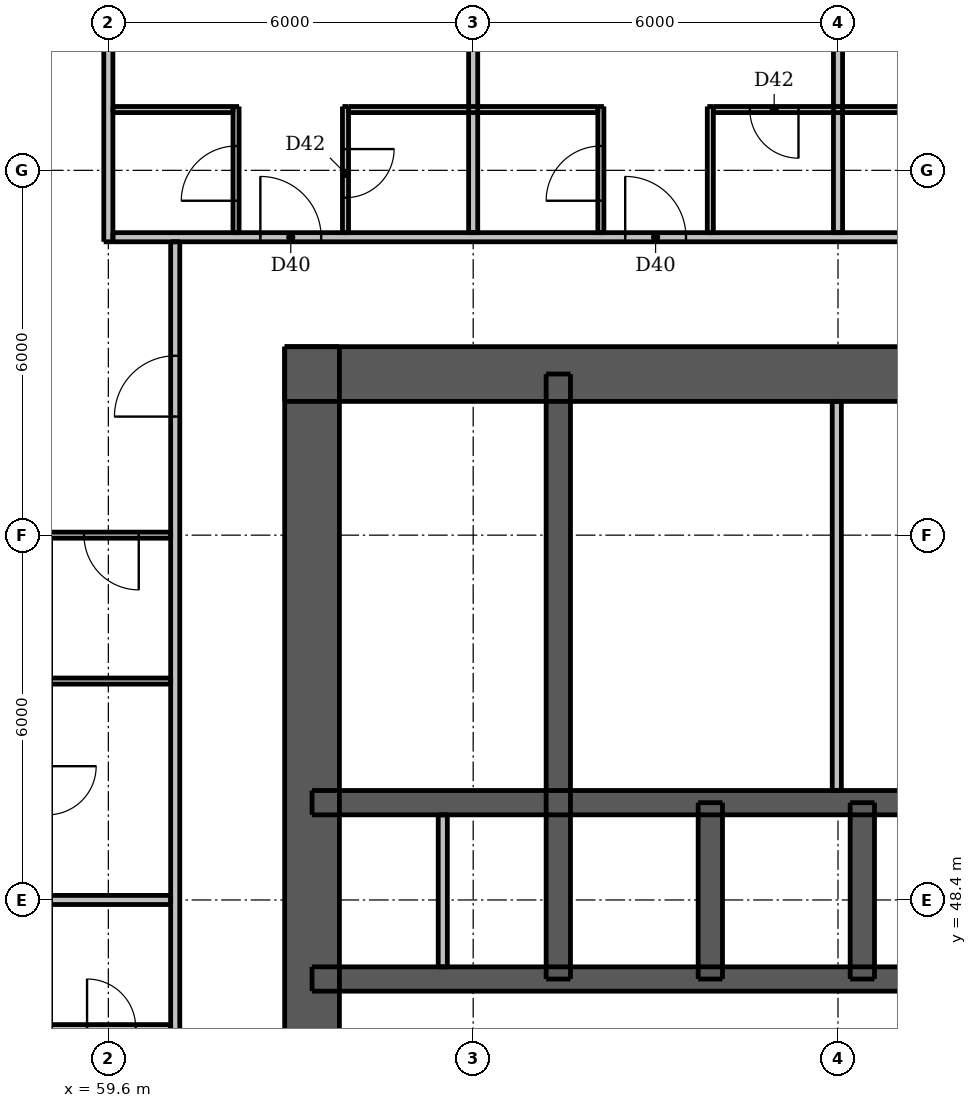
"""IFC4 building model, lengths in metres.
Left out: names, types, materials, properties, quantities, classifications, styles, units other than length and angle.
Written with IfcOpenShell. Run it as: python <this file> out.ifc"""

import sys

from ifc_helpers import new_model, si_unit, direction, frame, frame_2d, origin, place, context, subcontext, project, spatial, rectangle, extrude, element, fill, save


model = new_model("IFC4")
c1 = context("Model", 3, precision=1e-05, world=origin(), true_north=direction((0.0, 1.0)))
c2 = subcontext(c1, "Body", "Model", "MODEL_VIEW")
j1 = project(units=[si_unit("LENGTHUNIT", "METRE"), si_unit("PLANEANGLEUNIT", "RADIAN")], contexts=[c1])
p1 = place(None, origin())
s1 = spatial("IfcSite", under=j1, at=p1, CompositionType="ELEMENT")
p2 = place(p1, origin())
s2 = spatial("IfcBuilding", under=s1, at=p2, CompositionType="ELEMENT")
p3 = place(p2, frame((0.0, 0.0, 30.1)))
s3 = spatial("IfcBuildingStorey", under=s2, at=p3, CompositionType="ELEMENT", Elevation=30.1)
p4 = place(p3, frame((62.5, 57.05, 0.0), z_axis=(0.0, 0.0, 1.0), x_axis=(1.0, 0.0, 0.0)))
e1 = element("IfcWall", 1, at=p4, inside=s3, PredefinedType="SHEAR", context=c2, shape_type="SweptSolid", body=[
    extrude(rectangle(XDim=24.0, YDim=0.9, at=frame_2d((12.0, 0.0))), origin(), (0.0, 0.0, 1.0), 3.05),
])
p5 = place(p4, frame((20.85, 0.0, 0.0)))
e2 = element("IfcOpeningElement", 2, at=p5, cuts=e1, PredefinedType="OPENING", context=c2, shape_type="SweptSolid", body=[
    extrude(rectangle(XDim=1.1, YDim=2.1, at=frame_2d((0.55, 1.05))), frame((0.0, 0.46, 0.0), z_axis=(0.0, -1.0, 0.0), x_axis=(1.0, 0.0, 0.0)), (0.0, 0.0, 1.0), 0.92),
])
p6 = place(p4, frame((2.05, 0.0, 0.0)))
e3 = element("IfcOpeningElement", 3, at=p6, cuts=e1, PredefinedType="OPENING", context=c2, shape_type="SweptSolid", body=[
    extrude(rectangle(XDim=1.1, YDim=2.1, at=frame_2d((0.55, 1.05))), frame((0.0, 0.46, 0.0), z_axis=(0.0, -1.0, 0.0), x_axis=(1.0, 0.0, 0.0)), (0.0, 0.0, 1.0), 0.92),
])
p7 = place(p4, frame((6.44, 0.0, 0.0)))
e4 = element("IfcOpeningElement", 4, at=p7, cuts=e1, PredefinedType="OPENING", context=c2, shape_type="SweptSolid", body=[
    extrude(rectangle(XDim=0.9, YDim=2.1, at=frame_2d((0.45, 1.05))), frame((0.0, 0.46, 0.0), z_axis=(0.0, -1.0, 0.0), x_axis=(1.0, 0.0, 0.0)), (0.0, 0.0, 1.0), 0.92),
])
p8 = place(p4, frame((13.74, 0.0, 0.0)))
e5 = element("IfcOpeningElement", 5, at=p8, cuts=e1, PredefinedType="OPENING", context=c2, shape_type="SweptSolid", body=[
    extrude(rectangle(XDim=0.9, YDim=2.1, at=frame_2d((0.45, 1.05))), frame((0.0, 0.46, 0.0), z_axis=(0.0, -1.0, 0.0), x_axis=(1.0, 0.0, 0.0)), (0.0, 0.0, 1.0), 0.92),
])
p9 = place(p3, frame((62.95, 33.5, 0.0), z_axis=(0.0, 0.0, 1.0), x_axis=(0.0, 1.0, 0.0)))
e6 = element("IfcWall", 6, at=p9, inside=s3, PredefinedType="SHEAR", context=c2, shape_type="SweptSolid", body=[
    extrude(rectangle(XDim=24.0, YDim=0.9, at=frame_2d((12.0, 0.0))), origin(), (0.0, 0.0, 1.0), 3.05),
])
p10 = place(p9, frame((11.2, 0.0, 0.0)))
e7 = element("IfcOpeningElement", 7, at=p10, cuts=e6, PredefinedType="OPENING", context=c2, shape_type="SweptSolid", body=[
    extrude(rectangle(XDim=1.6, YDim=2.1, at=frame_2d((0.8, 1.05))), frame((0.0, 0.46, 0.0), z_axis=(0.0, -1.0, 0.0), x_axis=(1.0, 0.0, 0.0)), (0.0, 0.0, 1.0), 0.92),
])
p11 = place(p3, frame((62.95, 47.1, 0.0), z_axis=(0.0, 0.0, 1.0), x_axis=(1.0, 0.0, 0.0)))
e8 = element("IfcWall", 8, at=p11, inside=s3, PredefinedType="SHEAR", context=c2, shape_type="SweptSolid", body=[
    extrude(rectangle(XDim=23.1, YDim=0.4, at=frame_2d((11.55, 0.0))), origin(), (0.0, 0.0, 1.0), 3.05),
])
p12 = place(p11, frame((0.85, 0.0, 0.0)))
e9 = element("IfcOpeningElement", 9, at=p12, cuts=e8, PredefinedType="OPENING", context=c2, shape_type="SweptSolid", body=[
    extrude(rectangle(XDim=0.9, YDim=2.1, at=frame_2d((0.45, 1.05))), frame((0.0, 0.21, 0.0), z_axis=(0.0, -1.0, 0.0), x_axis=(1.0, 0.0, 0.0)), (0.0, 0.0, 1.0), 0.42),
])
p13 = place(p11, frame((2.55, 0.0, 0.0)))
e10 = element("IfcOpeningElement", 10, at=p13, cuts=e8, PredefinedType="OPENING", context=c2, shape_type="SweptSolid", body=[
    extrude(rectangle(XDim=0.9, YDim=2.1, at=frame_2d((0.45, 1.05))), frame((0.0, 0.21, 0.0), z_axis=(0.0, -1.0, 0.0), x_axis=(1.0, 0.0, 0.0)), (0.0, 0.0, 1.0), 0.42),
])
p14 = place(p11, frame((20.5, 0.0, 0.0)))
e11 = element("IfcOpeningElement", 11, at=p14, cuts=e8, PredefinedType="OPENING", context=c2, shape_type="SweptSolid", body=[
    extrude(rectangle(XDim=0.9, YDim=2.1, at=frame_2d((0.45, 1.05))), frame((0.0, 0.21, 0.0), z_axis=(0.0, -1.0, 0.0), x_axis=(1.0, 0.0, 0.0)), (0.0, 0.0, 1.0), 0.42),
])
p15 = place(p3, frame((62.95, 50.0, 0.0), z_axis=(0.0, 0.0, 1.0), x_axis=(1.0, 0.0, 0.0)))
e12 = element("IfcWall", 12, at=p15, inside=s3, PredefinedType="SHEAR", context=c2, shape_type="SweptSolid", body=[
    extrude(rectangle(XDim=23.1, YDim=0.4, at=frame_2d((11.55, 0.0))), origin(), (0.0, 0.0, 1.0), 3.05),
])
p16 = place(p3, frame((67.0, 47.1, 0.0), z_axis=(0.0, 0.0, 1.0), x_axis=(0.0, 1.0, 0.0)))
e13 = element("IfcWall", 13, at=p16, inside=s3, PredefinedType="SHEAR", context=c2, shape_type="SweptSolid", body=[
    extrude(rectangle(XDim=9.95, YDim=0.4, at=frame_2d((4.975, 0.0))), origin(), (0.0, 0.0, 1.0), 3.05),
])
for number, where, z_axis, x_axis in (
    (14, (69.5, 47.1, 0.0), (0.0, 0.0, 1.0), (0.0, 1.0, 0.0)),
    (15, (72.0, 47.1, 0.0), (0.0, 0.0, 1.0), (0.0, 1.0, 0.0)),
):
    element("IfcWall", number, at=place(p3, frame(where, z_axis=z_axis, x_axis=x_axis)), inside=s3, PredefinedType="SHEAR", context=c2, shape_type="SweptSolid", body=[
        extrude(rectangle(XDim=2.9, YDim=0.4, at=frame_2d((1.45, 0.0))), origin(), (0.0, 0.0, 1.0), 3.05),
    ])
p17 = place(p3, frame((65.1, 47.3, 0.0), z_axis=(0.0, 0.0, 1.0), x_axis=(0.0, 1.0, 0.0)))
e16 = element("IfcWall", 16, at=p17, inside=s3, PredefinedType="PLUMBINGWALL", context=c2, shape_type="SweptSolid", body=[
    extrude(rectangle(XDim=2.5, YDim=0.15, at=frame_2d((1.25, 0.0))), origin(), (0.0, 0.0, 1.0), 3.05),
])
p18 = place(p3, frame((71.58, 50.2, 0.0), z_axis=(0.0, 0.0, 1.0), x_axis=(0.0, 1.0, 0.0)))
e17 = element("IfcWall", 17, at=p18, inside=s3, PredefinedType="PLUMBINGWALL", context=c2, shape_type="SweptSolid", body=[
    extrude(rectangle(XDim=6.4, YDim=0.15, at=frame_2d((3.2, 0.0))), origin(), (0.0, 0.0, 1.0), 3.05),
])
p19 = place(p3, frame((61.7, 59.375, 0.0), z_axis=(0.0, 0.0, 1.0), x_axis=(0.0, 1.0, 0.0)))
e18 = element("IfcWall", 18, at=p19, inside=s3, PredefinedType="PARTITIONING", context=c2, shape_type="SweptSolid", body=[
    extrude(rectangle(XDim=2.075, YDim=0.1, at=frame_2d((1.038, 0.0))), origin(), (0.0, 0.0, 1.0), 3.05),
])
p20 = place(p19, frame((0.525, 0.0, 0.0)))
e19 = element("IfcOpeningElement", 19, at=p20, cuts=e18, PredefinedType="OPENING", context=c2, shape_type="SweptSolid", body=[
    extrude(rectangle(XDim=0.9, YDim=2.1, at=frame_2d((0.45, 1.05))), frame((0.0, 0.06, 0.0), z_axis=(0.0, -1.0, 0.0), x_axis=(1.0, 0.0, 0.0)), (0.0, 0.0, 1.0), 0.12),
])
p21 = place(p3, frame((63.5, 61.45, 0.0), z_axis=(0.0, 0.0, 1.0), x_axis=(0.0, -1.0, 0.0)))
e20 = element("IfcWall", 20, at=p21, inside=s3, PredefinedType="PARTITIONING", context=c2, shape_type="SweptSolid", body=[
    extrude(rectangle(XDim=2.075, YDim=0.1, at=frame_2d((1.038, 0.0))), origin(), (0.0, 0.0, 1.0), 3.05),
])
p22 = place(p21, frame((0.7, 0.0, 0.0)))
e21 = element("IfcOpeningElement", 21, at=p22, cuts=e20, PredefinedType="OPENING", context=c2, shape_type="SweptSolid", body=[
    extrude(rectangle(XDim=0.8, YDim=2.1, at=frame_2d((0.4, 1.05))), frame((0.0, 0.06, 0.0), z_axis=(0.0, -1.0, 0.0), x_axis=(1.0, 0.0, 0.0)), (0.0, 0.0, 1.0), 0.12),
])
p23 = place(p3, frame((67.7, 59.375, 0.0), z_axis=(0.0, 0.0, 1.0), x_axis=(0.0, 1.0, 0.0)))
e22 = element("IfcWall", 22, at=p23, inside=s3, PredefinedType="PARTITIONING", context=c2, shape_type="SweptSolid", body=[
    extrude(rectangle(XDim=2.075, YDim=0.1, at=frame_2d((1.038, 0.0))), origin(), (0.0, 0.0, 1.0), 3.05),
])
p24 = place(p23, frame((0.525, 0.0, 0.0)))
e23 = element("IfcOpeningElement", 23, at=p24, cuts=e22, PredefinedType="OPENING", context=c2, shape_type="SweptSolid", body=[
    extrude(rectangle(XDim=0.9, YDim=2.1, at=frame_2d((0.45, 1.05))), frame((0.0, 0.06, 0.0), z_axis=(0.0, -1.0, 0.0), x_axis=(1.0, 0.0, 0.0)), (0.0, 0.0, 1.0), 0.12),
])
p25 = place(p3, frame((69.5, 59.375, 0.0), z_axis=(0.0, 0.0, 1.0), x_axis=(0.0, 1.0, 0.0)))
e24 = element("IfcWall", 24, at=p25, inside=s3, PredefinedType="PARTITIONING", context=c2, shape_type="SweptSolid", body=[
    extrude(rectangle(XDim=2.075, YDim=0.1, at=frame_2d((1.038, 0.0))), origin(), (0.0, 0.0, 1.0), 3.05),
])
p26 = place(p3, frame((59.675, 61.4, 0.0), z_axis=(0.0, 0.0, 1.0), x_axis=(1.0, 0.0, 0.0)))
e25 = element("IfcWall", 25, at=p26, inside=s3, PredefinedType="PARTITIONING", context=c2, shape_type="SweptSolid", body=[
    extrude(rectangle(XDim=1.975, YDim=0.1, at=frame_2d((0.987, 0.0))), origin(), (0.0, 0.0, 1.0), 3.05),
])
p27 = place(p3, frame((63.55, 61.4, 0.0), z_axis=(0.0, 0.0, 1.0), x_axis=(1.0, 0.0, 0.0)))
e26 = element("IfcWall", 26, at=p27, inside=s3, PredefinedType="PARTITIONING", context=c2, shape_type="SweptSolid", body=[
    extrude(rectangle(XDim=4.1, YDim=0.1, at=frame_2d((2.05, 0.0))), origin(), (0.0, 0.0, 1.0), 3.05),
])
p28 = place(p3, frame((73.65, 61.4, 0.0), z_axis=(0.0, 0.0, 1.0), x_axis=(-1.0, 0.0, 0.0)))
e27 = element("IfcWall", 27, at=p28, inside=s3, PredefinedType="PARTITIONING", context=c2, shape_type="SweptSolid", body=[
    extrude(rectangle(XDim=4.1, YDim=0.1, at=frame_2d((2.05, 0.0))), origin(), (0.0, 0.0, 1.0), 3.05),
])
p29 = place(p28, frame((2.7, 0.0, 0.0)))
e28 = element("IfcOpeningElement", 28, at=p29, cuts=e27, PredefinedType="OPENING", context=c2, shape_type="SweptSolid", body=[
    extrude(rectangle(XDim=0.8, YDim=2.1, at=frame_2d((0.4, 1.05))), frame((0.0, 0.06, 0.0), z_axis=(0.0, -1.0, 0.0), x_axis=(1.0, 0.0, 0.0)), (0.0, 0.0, 1.0), 0.12),
])
p30 = place(p3, frame((60.625, 54.4, 0.0), z_axis=(0.0, 0.0, 1.0), x_axis=(-1.0, 0.0, 0.0)))
e29 = element("IfcWall", 29, at=p30, inside=s3, PredefinedType="PARTITIONING", context=c2, shape_type="SweptSolid", body=[
    extrude(rectangle(XDim=8.625, YDim=0.1, at=frame_2d((4.312, 0.0))), origin(), (0.0, 0.0, 1.0), 2.516),
])
p31 = place(p30, frame((0.525, 0.0, 0.0)))
e30 = element("IfcOpeningElement", 30, at=p31, cuts=e29, PredefinedType="OPENING", context=c2, shape_type="SweptSolid", body=[
    extrude(rectangle(XDim=0.9, YDim=2.1, at=frame_2d((0.45, 1.05))), frame((0.0, 0.06, 0.0), z_axis=(0.0, -1.0, 0.0), x_axis=(1.0, 0.0, 0.0)), (0.0, 0.0, 1.0), 0.12),
])
p32 = place(p30, frame((4.875, 0.0, 0.0)))
e31 = element("IfcOpeningElement", 31, at=p32, cuts=e29, PredefinedType="OPENING", context=c2, shape_type="SweptSolid", body=[
    extrude(rectangle(XDim=0.9, YDim=2.1, at=frame_2d((0.45, 1.05))), frame((0.0, 0.06, 0.0), z_axis=(0.0, -1.0, 0.0), x_axis=(1.0, 0.0, 0.0)), (0.0, 0.0, 1.0), 0.12),
])
p33 = place(p3, frame((58.65, 52.0, 0.0), z_axis=(0.0, 0.0, 1.0), x_axis=(1.0, 0.0, 0.0)))
e32 = element("IfcWall", 32, at=p33, inside=s3, PredefinedType="PARTITIONING", context=c2, shape_type="SweptSolid", body=[
    extrude(rectangle(XDim=1.975, YDim=0.1, at=frame_2d((0.988, 0.0))), origin(), (0.0, 0.0, 1.0), 3.05),
])
p34 = place(p3, frame((58.65, 46.3, 0.0), z_axis=(0.0, 0.0, 1.0), x_axis=(1.0, 0.0, 0.0)))
e33 = element("IfcWall", 33, at=p34, inside=s3, PredefinedType="PARTITIONING", context=c2, shape_type="SweptSolid", body=[
    extrude(rectangle(XDim=1.975, YDim=0.1, at=frame_2d((0.988, 0.0))), origin(), (0.0, 0.0, 1.0), 3.05),
])
p35 = place(p34, frame((0.6, 0.0, 0.0)))
e34 = element("IfcOpeningElement", 34, at=p35, cuts=e33, PredefinedType="OPENING", context=c2, shape_type="SweptSolid", body=[
    extrude(rectangle(XDim=0.8, YDim=2.1, at=frame_2d((0.4, 1.05))), frame((0.0, 0.06, 0.0), z_axis=(0.0, -1.0, 0.0), x_axis=(1.0, 0.0, 0.0)), (0.0, 0.0, 1.0), 0.12),
])
p36 = place(p3, frame((59.6, 59.225, 0.0), z_axis=(0.0, 0.0, 1.0), x_axis=(0.0, 1.0, 0.0)))
e35 = element("IfcWall", 35, at=p36, inside=s3, PredefinedType="PARTITIONING", context=c2, shape_type="SweptSolid", body=[
    extrude(rectangle(XDim=8.775, YDim=0.15, at=frame_2d((4.387, 0.0))), origin(), (0.0, 0.0, 1.0), 2.51),
])
p37 = place(p3, frame((60.7, 30.325, 0.0), z_axis=(0.0, 0.0, 1.0), x_axis=(0.0, 1.0, 0.0)))
e36 = element("IfcWall", 36, at=p37, inside=s3, PredefinedType="PARTITIONING", context=c2, shape_type="SweptSolid", body=[
    extrude(rectangle(XDim=28.9, YDim=0.15, at=frame_2d((14.45, 0.0))), origin(), (0.0, 0.0, 1.0), 3.05),
])
p38 = place(p37, frame((2.575, 0.0, 0.0)))
e37 = element("IfcOpeningElement", 37, at=p38, cuts=e36, PredefinedType="OPENING", context=c2, shape_type="SweptSolid", body=[
    extrude(rectangle(XDim=1.0, YDim=2.1, at=frame_2d((0.5, 1.05))), frame((0.0, 0.085, 0.0), z_axis=(0.0, -1.0, 0.0), x_axis=(1.0, 0.0, 0.0)), (0.0, 0.0, 1.0), 0.17),
])
p39 = place(p37, frame((8.575, 0.0, 0.0)))
e38 = element("IfcOpeningElement", 38, at=p39, cuts=e36, PredefinedType="OPENING", context=c2, shape_type="SweptSolid", body=[
    extrude(rectangle(XDim=1.0, YDim=2.1, at=frame_2d((0.5, 1.05))), frame((0.0, 0.085, 0.0), z_axis=(0.0, -1.0, 0.0), x_axis=(1.0, 0.0, 0.0)), (0.0, 0.0, 1.0), 0.17),
])
p40 = place(p37, frame((14.575, 0.0, 0.0)))
e39 = element("IfcOpeningElement", 39, at=p40, cuts=e36, PredefinedType="OPENING", context=c2, shape_type="SweptSolid", body=[
    extrude(rectangle(XDim=1.0, YDim=2.1, at=frame_2d((0.5, 1.05))), frame((0.0, 0.085, 0.0), z_axis=(0.0, -1.0, 0.0), x_axis=(1.0, 0.0, 0.0)), (0.0, 0.0, 1.0), 0.17),
])
p41 = place(p37, frame((26.025, 0.0, 0.0)))
e40 = element("IfcOpeningElement", 40, at=p41, cuts=e36, PredefinedType="OPENING", context=c2, shape_type="SweptSolid", body=[
    extrude(rectangle(XDim=1.0, YDim=2.1, at=frame_2d((0.5, 1.05))), frame((0.0, 0.085, 0.0), z_axis=(0.0, -1.0, 0.0), x_axis=(1.0, 0.0, 0.0)), (0.0, 0.0, 1.0), 0.17),
])
for number, where, z_axis, x_axis in (
    (41, (65.6, 59.375, 0.0), (0.0, 0.0, 1.0), (0.0, 1.0, 0.0)),
    (42, (71.6, 59.375, 0.0), (0.0, 0.0, 1.0), (0.0, 1.0, 0.0)),
):
    element("IfcWall", number, at=place(p3, frame(where, z_axis=z_axis, x_axis=x_axis)), inside=s3, PredefinedType="PARTITIONING", context=c2, shape_type="SweptSolid", body=[
        extrude(rectangle(XDim=8.625, YDim=0.15, at=frame_2d((4.312, 0.0))), origin(), (0.0, 0.0, 1.0), 2.516),
    ])
p42 = place(p3, frame((59.675, 59.3, 0.0), z_axis=(0.0, 0.0, 1.0), x_axis=(1.0, 0.0, 0.0)))
e43 = element("IfcWall", 43, at=p42, inside=s3, PredefinedType="PARTITIONING", context=c2, shape_type="SweptSolid", body=[
    extrude(rectangle(XDim=28.55, YDim=0.15, at=frame_2d((14.275, 0.0))), origin(), (0.0, 0.0, 1.0), 3.05),
])
p43 = place(p42, frame((2.425, 0.0, 0.0)))
e44 = element("IfcOpeningElement", 44, at=p43, cuts=e43, PredefinedType="OPENING", context=c2, shape_type="SweptSolid", body=[
    extrude(rectangle(XDim=1.0, YDim=2.1, at=frame_2d((0.5, 1.05))), frame((0.0, 0.085, 0.0), z_axis=(0.0, -1.0, 0.0), x_axis=(1.0, 0.0, 0.0)), (0.0, 0.0, 1.0), 0.17),
])
p44 = place(p42, frame((8.425, 0.0, 0.0)))
e45 = element("IfcOpeningElement", 45, at=p44, cuts=e43, PredefinedType="OPENING", context=c2, shape_type="SweptSolid", body=[
    extrude(rectangle(XDim=1.0, YDim=2.1, at=frame_2d((0.5, 1.05))), frame((0.0, 0.085, 0.0), z_axis=(0.0, -1.0, 0.0), x_axis=(1.0, 0.0, 0.0)), (0.0, 0.0, 1.0), 0.17),
])
p45 = place(p42, frame((14.425, 0.0, 0.0)))
e46 = element("IfcOpeningElement", 46, at=p45, cuts=e43, PredefinedType="OPENING", context=c2, shape_type="SweptSolid", body=[
    extrude(rectangle(XDim=1.0, YDim=2.1, at=frame_2d((0.5, 1.05))), frame((0.0, 0.085, 0.0), z_axis=(0.0, -1.0, 0.0), x_axis=(1.0, 0.0, 0.0)), (0.0, 0.0, 1.0), 0.17),
])
p46 = place(p42, frame((25.775, 0.0, 0.0)))
e47 = element("IfcOpeningElement", 47, at=p46, cuts=e43, PredefinedType="OPENING", context=c2, shape_type="SweptSolid", body=[
    extrude(rectangle(XDim=1.0, YDim=2.1, at=frame_2d((0.5, 1.05))), frame((0.0, 0.085, 0.0), z_axis=(0.0, -1.0, 0.0), x_axis=(1.0, 0.0, 0.0)), (0.0, 0.0, 1.0), 0.17),
])
p47 = place(p3, frame((52.0, 48.4, 0.0), z_axis=(0.0, 0.0, 1.0), x_axis=(1.0, 0.0, 0.0)))
e48 = element("IfcWall", 48, at=p47, inside=s3, PredefinedType="PARTITIONING", context=c2, shape_type="SweptSolid", body=[
    extrude(rectangle(XDim=8.625, YDim=0.15, at=frame_2d((4.312, 0.0))), origin(), (0.0, 0.0, 1.0), 2.516),
])
p48 = place(p6, origin())
e49 = element("IfcDoor", 49, at=p48, inside=s3, OperationType="SINGLE_SWING_LEFT", PredefinedType="DOOR", context=c2, shape_type="SweptSolid", body=[
    extrude(rectangle(XDim=1.1, YDim=2.1, at=frame_2d((0.55, 1.05))), frame((0.0, -0.388, 0.0), z_axis=(0.0, -1.0, 0.0), x_axis=(1.0, 0.0, 0.0)), (0.0, 0.0, 1.0), 0.05),
])
fill(e3, e49)
p49 = place(p12, origin())
e50 = element("IfcDoor", 50, at=p49, inside=s3, OperationType="SINGLE_SWING_LEFT", PredefinedType="DOOR", context=c2, shape_type="SweptSolid", body=[
    extrude(rectangle(XDim=0.9, YDim=2.1, at=frame_2d((0.45, 1.05))), frame((0.0, 0.188, 0.0), z_axis=(0.0, -1.0, 0.0), x_axis=(1.0, 0.0, 0.0)), (0.0, 0.0, 1.0), 0.05),
])
fill(e9, e50)
p50 = place(p13, origin())
e51 = element("IfcDoor", 51, at=p50, inside=s3, OperationType="SINGLE_SWING_RIGHT", PredefinedType="DOOR", context=c2, shape_type="SweptSolid", body=[
    extrude(rectangle(XDim=0.9, YDim=2.1, at=frame_2d((0.45, 1.05))), frame((0.0, 0.188, 0.0), z_axis=(0.0, -1.0, 0.0), x_axis=(1.0, 0.0, 0.0)), (0.0, 0.0, 1.0), 0.05),
])
fill(e10, e51)
p51 = place(p7, origin())
e52 = element("IfcDoor", 52, at=p51, inside=s3, OperationType="SINGLE_SWING_RIGHT", PredefinedType="DOOR", context=c2, shape_type="SweptSolid", body=[
    extrude(rectangle(XDim=0.9, YDim=2.1, at=frame_2d((0.45, 1.05))), frame((0.0, -0.388, 0.0), z_axis=(0.0, -1.0, 0.0), x_axis=(1.0, 0.0, 0.0)), (0.0, 0.0, 1.0), 0.05),
])
fill(e4, e52)
p52 = place(p43, origin())
e53 = element("IfcDoor", 53, at=p52, inside=s3, OperationType="SINGLE_SWING_LEFT", PredefinedType="DOOR", context=c2, shape_type="SweptSolid", body=[
    extrude(rectangle(XDim=1.0, YDim=2.1, at=frame_2d((0.5, 1.05))), frame((0.0, 0.025, 0.0), z_axis=(0.0, -1.0, 0.0), x_axis=(1.0, 0.0, 0.0)), (0.0, 0.0, 1.0), 0.05),
])
fill(e44, e53)
p53 = place(p20, origin())
e54 = element("IfcDoor", 54, at=p53, inside=s3, OperationType="SINGLE_SWING_LEFT", PredefinedType="DOOR", context=c2, shape_type="SweptSolid", body=[
    extrude(rectangle(XDim=0.9, YDim=2.1, at=frame_2d((0.45, 1.05))), frame((0.0, 0.025, 0.0), z_axis=(0.0, -1.0, 0.0), x_axis=(1.0, 0.0, 0.0)), (0.0, 0.0, 1.0), 0.05),
])
fill(e19, e54)
p54 = place(p22, origin())
e55 = element("IfcDoor", 55, at=p54, inside=s3, OperationType="SINGLE_SWING_LEFT", PredefinedType="DOOR", context=c2, shape_type="SweptSolid", body=[
    extrude(rectangle(XDim=0.8, YDim=2.1, at=frame_2d((0.4, 1.05))), frame((0.0, 0.025, 0.0), z_axis=(0.0, -1.0, 0.0), x_axis=(1.0, 0.0, 0.0)), (0.0, 0.0, 1.0), 0.05),
])
fill(e21, e55)
p55 = place(p44, origin())
e56 = element("IfcDoor", 56, at=p55, inside=s3, OperationType="SINGLE_SWING_LEFT", PredefinedType="DOOR", context=c2, shape_type="SweptSolid", body=[
    extrude(rectangle(XDim=1.0, YDim=2.1, at=frame_2d((0.5, 1.05))), frame((0.0, 0.025, 0.0), z_axis=(0.0, -1.0, 0.0), x_axis=(1.0, 0.0, 0.0)), (0.0, 0.0, 1.0), 0.05),
])
fill(e45, e56)
p56 = place(p24, origin())
e57 = element("IfcDoor", 57, at=p56, inside=s3, OperationType="SINGLE_SWING_LEFT", PredefinedType="DOOR", context=c2, shape_type="SweptSolid", body=[
    extrude(rectangle(XDim=0.9, YDim=2.1, at=frame_2d((0.45, 1.05))), frame((0.0, 0.025, 0.0), z_axis=(0.0, -1.0, 0.0), x_axis=(1.0, 0.0, 0.0)), (0.0, 0.0, 1.0), 0.05),
])
fill(e23, e57)
p57 = place(p29, origin())
e58 = element("IfcDoor", 58, at=p57, inside=s3, OperationType="SINGLE_SWING_LEFT", PredefinedType="DOOR", context=c2, shape_type="SweptSolid", body=[
    extrude(rectangle(XDim=0.8, YDim=2.1, at=frame_2d((0.4, 1.05))), frame((0.0, 0.025, 0.0), z_axis=(0.0, -1.0, 0.0), x_axis=(1.0, 0.0, 0.0)), (0.0, 0.0, 1.0), 0.05),
])
fill(e28, e58)
p58 = place(p35, origin())
e59 = element("IfcDoor", 59, at=p58, inside=s3, OperationType="SINGLE_SWING_LEFT", PredefinedType="DOOR", context=c2, shape_type="SweptSolid", body=[
    extrude(rectangle(XDim=0.8, YDim=2.1, at=frame_2d((0.4, 1.05))), frame((0.0, 0.025, 0.0), z_axis=(0.0, -1.0, 0.0), x_axis=(1.0, 0.0, 0.0)), (0.0, 0.0, 1.0), 0.05),
])
fill(e34, e59)
p59 = place(p41, origin())
e60 = element("IfcDoor", 60, at=p59, inside=s3, OperationType="SINGLE_SWING_LEFT", PredefinedType="DOOR", context=c2, shape_type="SweptSolid", body=[
    extrude(rectangle(XDim=1.0, YDim=2.1, at=frame_2d((0.5, 1.05))), frame((0.0, 0.025, 0.0), z_axis=(0.0, -1.0, 0.0), x_axis=(1.0, 0.0, 0.0)), (0.0, 0.0, 1.0), 0.05),
])
fill(e40, e60)
p60 = place(p31, origin())
e61 = element("IfcDoor", 61, at=p60, inside=s3, OperationType="SINGLE_SWING_LEFT", PredefinedType="DOOR", context=c2, shape_type="SweptSolid", body=[
    extrude(rectangle(XDim=0.9, YDim=2.1, at=frame_2d((0.45, 1.05))), frame((0.0, 0.025, 0.0), z_axis=(0.0, -1.0, 0.0), x_axis=(1.0, 0.0, 0.0)), (0.0, 0.0, 1.0), 0.05),
])
fill(e30, e61)
save(model, sys.argv[1])
